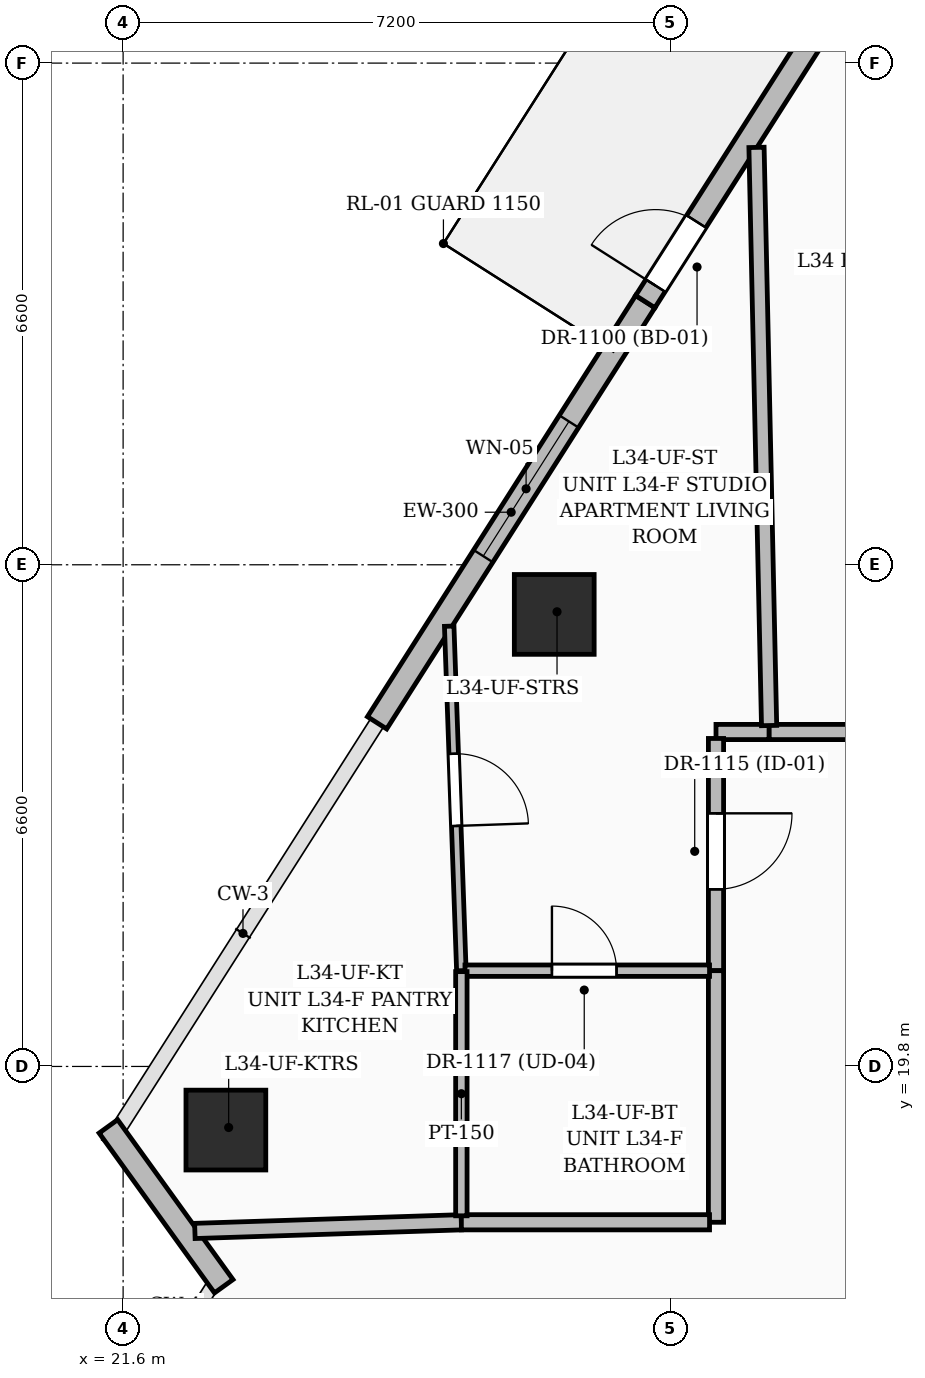
"""IFC4 building model, lengths in metres.
Left out: names, types, materials, properties, quantities, classifications, styles, units other than length and angle.
Written with IfcOpenShell. Run it as: python <this file> out.ifc"""

import sys

from ifc_helpers import new_model, si_unit, direction, frame, frame_2d, origin, origin_2d, place, context, subcontext, project, spatial, rectangle, extrude, element, fill, save


model = new_model("IFC4")
c1 = context("Model", 3, precision=1e-05, world=origin(), true_north=direction((0.0, 1.0)))
c2 = subcontext(c1, "Body", "Model", "MODEL_VIEW")
j1 = project(units=[si_unit("LENGTHUNIT", "METRE"), si_unit("PLANEANGLEUNIT", "RADIAN")], contexts=[c1])
p1 = place(None, origin())
s1 = spatial("IfcSite", under=j1, at=p1, CompositionType="ELEMENT")
p2 = place(p1, origin())
s2 = spatial("IfcBuilding", under=s1, at=p2, CompositionType="ELEMENT")
p3 = place(p2, frame((0.0, 0.0, 135.6)))
s3 = spatial("IfcBuildingStorey", under=s2, at=p3, CompositionType="ELEMENT", Elevation=135.6)
for number, where, z_axis, x_axis in (
    (1, (27.272, 25.747, 0.0), (0.0, 0.0, 1.0), (1.0, 0.0, 0.0)),
    (2, (22.952, 18.963, 0.0), (0.0, 0.0, 1.0), (1.0, 0.0, 0.0)),
):
    element("IfcColumn", number, at=place(p3, frame(where, z_axis=z_axis, x_axis=x_axis)), inside=s3, PredefinedType="COLUMN", context=c2, shape_type="SweptSolid", body=[
        extrude(rectangle(XDim=1.05, YDim=1.05, at=origin_2d()), origin(), (0.0, 0.0, 1.0), 3.6),
    ])
p4 = place(p3, frame((22.924, 16.908, 0.0), z_axis=(0.0, 0.0, 1.0), x_axis=(-0.585229316709, 0.810867835633, 0.0)))
e3 = element("IfcWall", 3, at=p4, inside=s3, PredefinedType="SOLIDWALL", context=c2, shape_type="SweptSolid", body=[
    extrude(rectangle(XDim=2.594, YDim=0.3, at=frame_2d((1.297, 0.0))), origin(), (0.0, 0.0, 1.0), 2.575),
])
p5 = place(p3, frame((24.941, 24.321, 0.0), z_axis=(0.0, 0.0, 1.0), x_axis=(0.537099115242, 0.84351914051, 0.0)))
e4 = element("IfcWall", 4, at=p5, inside=s3, PredefinedType="SOLIDWALL", context=c2, shape_type="SweptSolid", body=[
    extrude(rectangle(XDim=6.569, YDim=0.3, at=frame_2d((3.285, 0.0))), origin(), (0.0, 0.0, 1.0), 3.35),
])
p6 = place(p5, frame((2.6, 0.0, 0.55)))
e5 = element("IfcOpeningElement", 5, at=p6, cuts=e4, PredefinedType="OPENING", context=c2, shape_type="SweptSolid", body=[
    extrude(rectangle(XDim=2.1, YDim=2.4, at=frame_2d((1.05, 1.2))), frame((0.0, 0.16, 0.0), z_axis=(0.0, -1.0, 0.0), x_axis=(1.0, 0.0, 0.0)), (0.0, 0.0, 1.0), 0.32),
])
p7 = place(p3, frame((28.469, 29.862, 0.0), z_axis=(0.0, 0.0, 1.0), x_axis=(0.537115953095, 0.843508419004, 0.0)))
e6 = element("IfcWall", 6, at=p7, inside=s3, PredefinedType="SOLIDWALL", context=c2, shape_type="SweptSolid", body=[
    extrude(rectangle(XDim=6.569, YDim=0.3, at=frame_2d((3.285, 0.0))), origin(), (0.0, 0.0, 1.0), 3.35),
])
p8 = place(p7, frame((0.25, 0.0, 0.0)))
e7 = element("IfcOpeningElement", 7, at=p8, cuts=e6, PredefinedType="OPENING", context=c2, shape_type="SweptSolid", body=[
    extrude(rectangle(XDim=1.0, YDim=2.2, at=frame_2d((0.5, 1.1))), frame((0.0, 0.16, 0.0), z_axis=(0.0, -1.0, 0.0), x_axis=(1.0, 0.0, 0.0)), (0.0, 0.0, 1.0), 0.32),
])
p9 = place(p3, frame((30.1, 24.2, 0.0), z_axis=(0.0, 0.0, 1.0), x_axis=(-1.0, 0.0, 0.0)))
e8 = element("IfcWall", 8, at=p9, inside=s3, PredefinedType="PARTITIONING", context=c2, shape_type="SweptSolid", body=[
    extrude(rectangle(XDim=0.7, YDim=0.2, at=frame_2d((0.35, 0.0))), origin(), (0.0, 0.0, 1.0), 2.709),
])
p10 = place(p3, frame((29.4, 24.115, 0.0), z_axis=(0.0, 0.0, 1.0), x_axis=(0.0, -1.0, 0.0)))
e9 = element("IfcWall", 9, at=p10, inside=s3, PredefinedType="PARTITIONING", context=c2, shape_type="SweptSolid", body=[
    extrude(rectangle(XDim=3.055, YDim=0.2, at=frame_2d((1.527, 0.0))), origin(), (0.0, 0.0, 1.0), 2.372),
])
p11 = place(p10, frame((0.985, 0.0, 0.0)))
e10 = element("IfcOpeningElement", 10, at=p11, cuts=e9, PredefinedType="OPENING", context=c2, shape_type="SweptSolid", body=[
    extrude(rectangle(XDim=1.0, YDim=2.2, at=frame_2d((0.5, 1.1))), frame((0.0, 0.11, 0.0), z_axis=(0.0, -1.0, 0.0), x_axis=(1.0, 0.0, 0.0)), (0.0, 0.0, 1.0), 0.22),
])
p12 = place(p3, frame((26.05, 17.75, 0.0), z_axis=(0.0, 0.0, 1.0), x_axis=(-0.999471688419, -0.032501446869, 0.0)))
e11 = element("IfcWall", 11, at=p12, inside=s3, PredefinedType="PARTITIONING", context=c2, shape_type="SweptSolid", body=[
    extrude(rectangle(XDim=3.508, YDim=0.2, at=frame_2d((1.754, 0.0))), origin(), (0.0, 0.0, 1.0), 2.372),
])
p13 = place(p3, frame((29.4, 21.06, 0.0), z_axis=(0.0, 0.0, 1.0), x_axis=(0.0, -1.0, 0.0)))
e12 = element("IfcWall", 12, at=p13, inside=s3, PredefinedType="PARTITIONING", context=c2, shape_type="SweptSolid", body=[
    extrude(rectangle(XDim=3.31, YDim=0.2, at=frame_2d((1.655, 0.0))), origin(), (0.0, 0.0, 1.0), 2.709),
])
p14 = place(p3, frame((29.315, 17.75, 0.0), z_axis=(0.0, 0.0, 1.0), x_axis=(-1.0, 0.0, 0.0)))
e13 = element("IfcWall", 13, at=p14, inside=s3, PredefinedType="PARTITIONING", context=c2, shape_type="SweptSolid", body=[
    extrude(rectangle(XDim=3.265, YDim=0.2, at=frame_2d((1.632, 0.0))), origin(), (0.0, 0.0, 1.0), 2.709),
])
p15 = place(p3, frame((31.865, 24.2, 0.0), z_axis=(0.0, 0.0, 1.0), x_axis=(-1.0, 0.0, 0.0)))
e14 = element("IfcWall", 14, at=p15, inside=s3, PredefinedType="PARTITIONING", context=c2, shape_type="SweptSolid", body=[
    extrude(rectangle(XDim=1.765, YDim=0.2, at=frame_2d((0.882, 0.0))), origin(), (0.0, 0.0, 1.0), 2.709),
])
p16 = place(p3, frame((25.89, 25.592, 0.0), z_axis=(0.0, 0.0, 1.0), x_axis=(0.03531706941, -0.999376157715, 0.0)))
e15 = element("IfcWall", 15, at=p16, inside=s3, PredefinedType="PARTITIONING", context=c2, shape_type="SweptSolid", body=[
    extrude(rectangle(XDim=4.535, YDim=0.125, at=frame_2d((2.268, 0.0))), origin(), (0.0, 0.0, 1.0), 2.57),
])
p17 = place(p16, frame((1.679, 0.0, 0.0)))
e16 = element("IfcOpeningElement", 16, at=p17, cuts=e15, PredefinedType="OPENING", context=c2, shape_type="SweptSolid", body=[
    extrude(rectangle(XDim=0.95, YDim=2.2, at=frame_2d((0.475, 1.1))), frame((0.0, 0.072, 0.0), z_axis=(0.0, -1.0, 0.0), x_axis=(1.0, 0.0, 0.0)), (0.0, 0.0, 1.0), 0.145),
])
p18 = place(p3, frame((26.097, 21.06, 0.0), z_axis=(0.0, 0.0, 1.0), x_axis=(1.0, 0.0, 0.0)))
e17 = element("IfcWall", 17, at=p18, inside=s3, PredefinedType="PARTITIONING", context=c2, shape_type="SweptSolid", body=[
    extrude(rectangle(XDim=3.218, YDim=0.15, at=frame_2d((1.609, 0.0))), origin(), (0.0, 0.0, 1.0), 2.709),
])
p19 = place(p18, frame((1.144, 0.0, 0.0)))
e18 = element("IfcOpeningElement", 18, at=p19, cuts=e17, PredefinedType="OPENING", context=c2, shape_type="SweptSolid", body=[
    extrude(rectangle(XDim=0.85, YDim=2.1, at=frame_2d((0.425, 1.05))), frame((0.0, 0.085, 0.0), z_axis=(0.0, -1.0, 0.0), x_axis=(1.0, 0.0, 0.0)), (0.0, 0.0, 1.0), 0.17),
])
p20 = place(p3, frame((30.099, 24.285, 0.0), z_axis=(0.0, 0.0, 1.0), x_axis=(-0.021757005601, 0.999763288337, 0.0)))
e19 = element("IfcWall", 19, at=p20, inside=s3, PredefinedType="PARTITIONING", context=c2, shape_type="SweptSolid", body=[
    extrude(rectangle(XDim=7.608, YDim=0.2, at=frame_2d((3.804, 0.0))), origin(), (0.0, 0.0, 1.0), 2.57),
])
p21 = place(p3, frame((26.05, 17.835, 0.0), z_axis=(0.0, 0.0, 1.0), x_axis=(0.0, 1.0, 0.0)))
e20 = element("IfcWall", 20, at=p21, inside=s3, PredefinedType="PARTITIONING", context=c2, shape_type="SweptSolid", body=[
    extrude(rectangle(XDim=3.213, YDim=0.15, at=frame_2d((1.606, 0.0))), origin(), (0.0, 0.0, 1.0), 2.709),
])
p22 = place(p6, origin())
e21 = element("IfcWindow", 21, at=p22, inside=s3, PartitioningType="SINGLE_PANEL", PredefinedType="WINDOW", context=c2, shape_type="SweptSolid", body=[
    extrude(rectangle(XDim=2.1, YDim=2.4, at=frame_2d((1.05, 1.2))), frame((0.0, 0.03, 0.0), z_axis=(0.0, -1.0, 0.0), x_axis=(1.0, 0.0, 0.0)), (0.0, 0.0, 1.0), 0.06),
])
fill(e5, e21)
p23 = place(p8, origin())
e22 = element("IfcDoor", 22, at=p23, inside=s3, OperationType="SINGLE_SWING_LEFT", PredefinedType="DOOR", context=c2, shape_type="SweptSolid", body=[
    extrude(rectangle(XDim=1.0, YDim=2.2, at=frame_2d((0.5, 1.1))), frame((0.0, 0.025, 0.0), z_axis=(0.0, -1.0, 0.0), x_axis=(1.0, 0.0, 0.0)), (0.0, 0.0, 1.0), 0.05),
])
fill(e7, e22)
p24 = place(p11, origin())
e23 = element("IfcDoor", 23, at=p24, inside=s3, OperationType="SINGLE_SWING_LEFT", PredefinedType="DOOR", context=c2, shape_type="SweptSolid", body=[
    extrude(rectangle(XDim=1.0, YDim=2.2, at=frame_2d((0.5, 1.1))), frame((0.0, 0.025, 0.0), z_axis=(0.0, -1.0, 0.0), x_axis=(1.0, 0.0, 0.0)), (0.0, 0.0, 1.0), 0.05),
])
fill(e10, e23)
p25 = place(p17, origin())
e24 = element("IfcDoor", 24, at=p25, inside=s3, OperationType="SINGLE_SWING_RIGHT", PredefinedType="DOOR", context=c2, shape_type="SweptSolid", body=[
    extrude(rectangle(XDim=0.95, YDim=2.2, at=frame_2d((0.475, 1.1))), frame((0.0, 0.025, 0.0), z_axis=(0.0, -1.0, 0.0), x_axis=(1.0, 0.0, 0.0)), (0.0, 0.0, 1.0), 0.05),
])
fill(e16, e24)
p26 = place(p19, origin())
e25 = element("IfcDoor", 25, at=p26, inside=s3, OperationType="SINGLE_SWING_LEFT", PredefinedType="DOOR", context=c2, shape_type="SweptSolid", body=[
    extrude(rectangle(XDim=0.85, YDim=2.1, at=frame_2d((0.425, 1.05))), frame((0.0, 0.025, 0.0), z_axis=(0.0, -1.0, 0.0), x_axis=(1.0, 0.0, 0.0)), (0.0, 0.0, 1.0), 0.05),
])
fill(e18, e25)
save(model, sys.argv[1])
